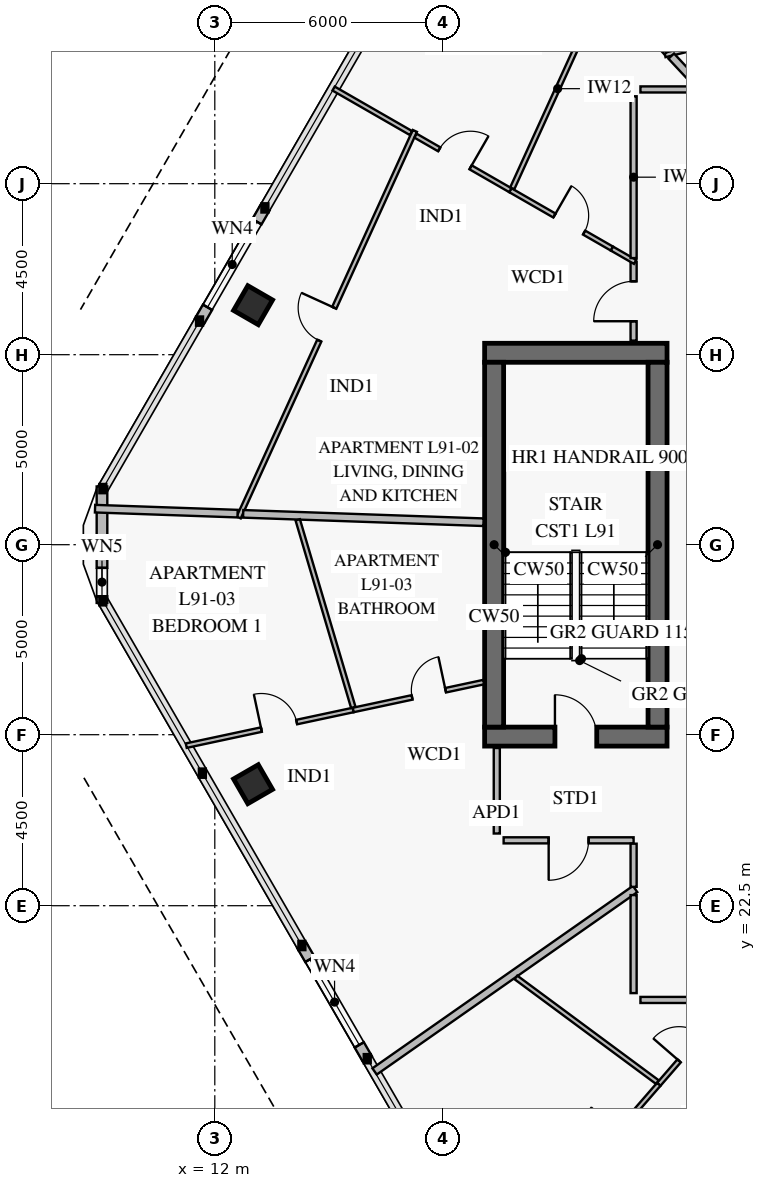
"""IFC4 building model, lengths in metres.
Left out: names, types, materials, properties, quantities, classifications, styles, units other than length and angle.
Written with IfcOpenShell. Run it as: python <this file> out.ifc"""

import sys

from ifc_helpers import new_model, si_unit, direction, frame, frame_2d, origin, origin_2d, place, context, subcontext, project, spatial, rectangle, extrude, element, fill, save


model = new_model("IFC4")
c1 = context("Model", 3, precision=1e-05, world=origin(), true_north=direction((0.0, 1.0)))
c2 = subcontext(c1, "Body", "Model", "MODEL_VIEW")
j1 = project(units=[si_unit("LENGTHUNIT", "METRE"), si_unit("PLANEANGLEUNIT", "RADIAN")], contexts=[c1])
p1 = place(None, origin())
s1 = spatial("IfcSite", under=j1, at=p1, CompositionType="ELEMENT")
p2 = place(p1, origin())
s2 = spatial("IfcBuilding", under=s1, at=p2, CompositionType="ELEMENT")
p3 = place(p2, frame((0.0, 0.0, 357.6)))
s3 = spatial("IfcBuildingStorey", under=s2, at=p3, CompositionType="ELEMENT", Elevation=357.6)
for number, where, z_axis, x_axis in (
    (1, (13.007, 38.302, 0.0), (0.0, 0.0, 1.0), (-0.5, -0.866, 0.0)),
    (2, (13.007, 25.698, 0.0), (0.0, 0.0, 1.0), (0.5, -0.866, 0.0)),
):
    element("IfcColumn", number, at=place(p3, frame(where, z_axis=z_axis, x_axis=x_axis)), inside=s3, PredefinedType="COLUMN", context=c2, shape_type="SweptSolid", body=[
        extrude(rectangle(XDim=0.75, YDim=0.75, at=origin_2d()), origin(), (0.0, 0.0, 1.0), 3.35),
    ])
p4 = place(p3, frame((19.1, 26.95, 0.0), z_axis=(0.0, 0.0, 1.0), x_axis=(1.0, 0.0, 0.0)))
e3 = element("IfcWall", 3, at=p4, inside=s3, PredefinedType="SHEAR", context=c2, shape_type="SweptSolid", body=[
    extrude(rectangle(XDim=4.8, YDim=0.5, at=frame_2d((2.4, 0.0))), origin(), (0.0, 0.0, 1.0), 3.8),
])
p5 = place(p4, frame((1.85, 0.0, 0.0)))
e4 = element("IfcOpeningElement", 4, at=p5, cuts=e3, PredefinedType="OPENING", context=c2, shape_type="SweptSolid", body=[
    extrude(rectangle(XDim=1.1, YDim=2.15, at=frame_2d((0.55, 1.075))), frame((0.0, 0.262, 0.0), z_axis=(0.0, -1.0, 0.0), x_axis=(1.0, 0.0, 0.0)), (0.0, 0.0, 1.0), 0.524),
])
p6 = place(p3, frame((23.9, 37.05, 0.0), z_axis=(0.0, 0.0, 1.0), x_axis=(-1.0, 0.0, 0.0)))
e5 = element("IfcWall", 5, at=p6, inside=s3, PredefinedType="SHEAR", context=c2, shape_type="SweptSolid", body=[
    extrude(rectangle(XDim=4.8, YDim=0.5, at=frame_2d((2.4, 0.0))), origin(), (0.0, 0.0, 1.0), 3.8),
])
for number, where, z_axis, x_axis in (
    (6, (19.35, 27.2, 0.0), (0.0, 0.0, 1.0), (0.0, 1.0, 0.0)),
    (7, (23.65, 36.8, 0.0), (0.0, 0.0, 1.0), (0.0, -1.0, 0.0)),
):
    element("IfcWall", number, at=place(p3, frame(where, z_axis=z_axis, x_axis=x_axis)), inside=s3, PredefinedType="SHEAR", context=c2, shape_type="SweptSolid", body=[
        extrude(rectangle(XDim=9.6, YDim=0.5, at=frame_2d((4.8, 0.0))), origin(), (0.0, 0.0, 1.0), 3.8),
    ])
p7 = place(p3, frame((16.011, 18.473, 0.0), z_axis=(0.0, 0.0, 1.0), x_axis=(-0.500009156386, 0.866020117278, 0.0)))
e8 = element("IfcWall", 8, at=p7, inside=s3, PredefinedType="SOLIDWALL", context=c2, shape_type="SweptSolid", body=[
    extrude(rectangle(XDim=3.44, YDim=0.28, at=frame_2d((1.72, 0.0))), origin(), (0.0, 0.0, 1.0), 3.35),
])
p8 = place(p7, frame((0.42, 0.0, 0.7)))
e9 = element("IfcOpeningElement", 9, at=p8, cuts=e8, PredefinedType="OPENING", context=c2, shape_type="SweptSolid", body=[
    extrude(rectangle(XDim=2.6, YDim=1.8, at=frame_2d((1.3, 0.9))), frame((0.0, 0.152, 0.0), z_axis=(0.0, -1.0, 0.0), x_axis=(1.0, 0.0, 0.0)), (0.0, 0.0, 1.0), 0.304),
])
p9 = place(p3, frame((9.031, 30.468, 0.0), z_axis=(0.0, 0.0, 1.0), x_axis=(0.0, 1.0, 0.0)))
e10 = element("IfcWall", 10, at=p9, inside=s3, PredefinedType="SOLIDWALL", context=c2, shape_type="SweptSolid", body=[
    extrude(rectangle(XDim=3.065, YDim=0.28, at=frame_2d((1.532, 0.0))), origin(), (0.0, 0.0, 1.0), 3.35),
])
p10 = place(p9, frame((0.173, 0.0, 0.85)))
e11 = element("IfcOpeningElement", 11, at=p10, cuts=e10, PredefinedType="OPENING", context=c2, shape_type="SweptSolid", body=[
    extrude(rectangle(XDim=0.75, YDim=1.5, at=frame_2d((0.375, 0.75))), frame((0.0, 0.152, 0.0), z_axis=(0.0, -1.0, 0.0), x_axis=(1.0, 0.0, 0.0)), (0.0, 0.0, 1.0), 0.304),
])
p11 = place(p3, frame((11.599, 37.884, 0.0), z_axis=(0.0, 0.0, 1.0), x_axis=(0.499978425106, 0.866037859697, 0.0)))
e12 = element("IfcWall", 12, at=p11, inside=s3, PredefinedType="SOLIDWALL", context=c2, shape_type="SweptSolid", body=[
    extrude(rectangle(XDim=3.44, YDim=0.28, at=frame_2d((1.72, 0.0))), origin(), (0.0, 0.0, 1.0), 3.35),
])
p12 = place(p11, frame((0.42, 0.0, 0.7)))
e13 = element("IfcOpeningElement", 13, at=p12, cuts=e12, PredefinedType="OPENING", context=c2, shape_type="SweptSolid", body=[
    extrude(rectangle(XDim=2.6, YDim=1.8, at=frame_2d((1.3, 0.9))), frame((0.0, 0.152, 0.0), z_axis=(0.0, -1.0, 0.0), x_axis=(1.0, 0.0, 0.0)), (0.0, 0.0, 1.0), 0.304),
])
p13 = place(p3, frame((17.264, 42.889, 0.0), z_axis=(0.0, 0.0, 1.0), x_axis=(-0.41468959687, -0.909962932348, 0.0)))
e14 = element("IfcWall", 14, at=p13, inside=s3, PredefinedType="PARTITIONING", context=c2, shape_type="SweptSolid", body=[
    extrude(rectangle(XDim=11.179, YDim=0.12, at=frame_2d((5.59, 0.0))), origin(), (0.0, 0.0, 1.0), 2.77),
])
p14 = place(p13, frame((5.115, 0.0, 0.0)))
e15 = element("IfcOpeningElement", 15, at=p14, cuts=e14, PredefinedType="OPENING", context=c2, shape_type="SweptSolid", body=[
    extrude(rectangle(XDim=0.95, YDim=2.1, at=frame_2d((0.475, 1.05))), frame((0.0, 0.072, 0.0), z_axis=(0.0, -1.0, 0.0), x_axis=(1.0, 0.0, 0.0)), (0.0, 0.0, 1.0), 0.144),
])
p15 = place(p3, frame((22.45, 39.792, 0.0), z_axis=(0.0, 0.0, 1.0), x_axis=(-0.86689518328, 0.498490462502, 0.0)))
e16 = element("IfcWall", 16, at=p15, inside=s3, PredefinedType="PARTITIONING", context=c2, shape_type="SweptSolid", body=[
    extrude(rectangle(XDim=3.083, YDim=0.12, at=frame_2d((1.542, 0.0))), origin(), (0.0, 0.0, 1.0), 3.35),
])
p16 = place(p15, frame((0.845, 0.0, 0.0)))
e17 = element("IfcOpeningElement", 17, at=p16, cuts=e16, PredefinedType="OPENING", context=c2, shape_type="SweptSolid", body=[
    extrude(rectangle(XDim=0.9, YDim=2.1, at=frame_2d((0.45, 1.05))), frame((0.0, 0.072, 0.0), z_axis=(0.0, -1.0, 0.0), x_axis=(1.0, 0.0, 0.0)), (0.0, 0.0, 1.0), 0.144),
])
p17 = place(p3, frame((19.777, 41.329, 0.0), z_axis=(0.0, 0.0, 1.0), x_axis=(-0.86688797535, 0.498502997176, 0.0)))
e18 = element("IfcWall", 18, at=p17, inside=s3, PredefinedType="PARTITIONING", context=c2, shape_type="SweptSolid", body=[
    extrude(rectangle(XDim=2.878, YDim=0.12, at=frame_2d((1.439, 0.0))), origin(), (0.0, 0.0, 1.0), 3.35),
])
p18 = place(p17, frame((1.208, 0.0, 0.0)))
e19 = element("IfcOpeningElement", 19, at=p18, cuts=e18, PredefinedType="OPENING", context=c2, shape_type="SweptSolid", body=[
    extrude(rectangle(XDim=0.95, YDim=2.1, at=frame_2d((0.475, 1.05))), frame((0.0, 0.072, 0.0), z_axis=(0.0, -1.0, 0.0), x_axis=(1.0, 0.0, 0.0)), (0.0, 0.0, 1.0), 0.144),
])
p19 = place(p3, frame((17.163, 42.832, 0.0), z_axis=(0.0, 0.0, 1.0), x_axis=(-0.866878245801, 0.498519916309, 0.0)))
e20 = element("IfcWall", 20, at=p19, inside=s3, PredefinedType="PARTITIONING", context=c2, shape_type="SweptSolid", body=[
    extrude(rectangle(XDim=2.35, YDim=0.12, at=frame_2d((1.175, 0.0))), origin(), (0.0, 0.0, 1.0), 2.77),
])
p20 = place(p3, frame((23.02, 39.441, 0.0), z_axis=(0.0, 0.0, 1.0), x_axis=(0.0, -1.0, 0.0)))
e21 = element("IfcWall", 21, at=p20, inside=s3, PredefinedType="PARTITIONING", context=c2, shape_type="SweptSolid", body=[
    extrude(rectangle(XDim=2.071, YDim=0.16, at=frame_2d((1.035, 0.0))), origin(), (0.0, 0.0, 1.0), 3.35),
])
p21 = place(p20, frame((0.51, 0.0, 0.0)))
e22 = element("IfcOpeningElement", 22, at=p21, cuts=e21, PredefinedType="OPENING", context=c2, shape_type="SweptSolid", body=[
    extrude(rectangle(XDim=1.05, YDim=2.15, at=frame_2d((0.525, 1.075))), frame((0.0, 0.092, 0.0), z_axis=(0.0, -1.0, 0.0), x_axis=(1.0, 0.0, 0.0)), (0.0, 0.0, 1.0), 0.184),
])
p22 = place(p3, frame((19.075, 28.384, 0.0), z_axis=(0.0, 0.0, 1.0), x_axis=(-0.977920196039, -0.208978683552, 0.0)))
e23 = element("IfcWall", 23, at=p22, inside=s3, PredefinedType="PARTITIONING", context=c2, shape_type="SweptSolid", body=[
    extrude(rectangle(XDim=3.514, YDim=0.12, at=frame_2d((1.757, 0.0))), origin(), (0.0, 0.0, 1.0), 3.35),
])
p23 = place(p22, frame((1.026, 0.0, 0.0)))
e24 = element("IfcOpeningElement", 24, at=p23, cuts=e23, PredefinedType="OPENING", context=c2, shape_type="SweptSolid", body=[
    extrude(rectangle(XDim=0.9, YDim=2.1, at=frame_2d((0.45, 1.05))), frame((0.0, 0.072, 0.0), z_axis=(0.0, -1.0, 0.0), x_axis=(1.0, 0.0, 0.0)), (0.0, 0.0, 1.0), 0.144),
])
p24 = place(p3, frame((15.638, 27.65, 0.0), z_axis=(0.0, 0.0, 1.0), x_axis=(-0.977931973844, -0.208923561462, 0.0)))
e25 = element("IfcWall", 25, at=p24, inside=s3, PredefinedType="PARTITIONING", context=c2, shape_type="SweptSolid", body=[
    extrude(rectangle(XDim=4.489, YDim=0.12, at=frame_2d((2.244, 0.0))), origin(), (0.0, 0.0, 1.0), 2.77),
])
p25 = place(p24, frame((1.517, 0.0, 0.0)))
e26 = element("IfcOpeningElement", 26, at=p25, cuts=e25, PredefinedType="OPENING", context=c2, shape_type="SweptSolid", body=[
    extrude(rectangle(XDim=0.95, YDim=2.1, at=frame_2d((0.475, 1.05))), frame((0.0, 0.072, 0.0), z_axis=(0.0, -1.0, 0.0), x_axis=(1.0, 0.0, 0.0)), (0.0, 0.0, 1.0), 0.144),
])
p26 = place(p3, frame((19.6, 24.22, 0.0), z_axis=(0.0, 0.0, 1.0), x_axis=(1.0, 0.0, 0.0)))
e27 = element("IfcWall", 27, at=p26, inside=s3, PredefinedType="PARTITIONING", context=c2, shape_type="SweptSolid", body=[
    extrude(rectangle(XDim=3.42, YDim=0.16, at=frame_2d((1.71, 0.0))), origin(), (0.0, 0.0, 1.0), 3.35),
])
p27 = place(p26, frame((1.185, 0.0, 0.0)))
e28 = element("IfcOpeningElement", 28, at=p27, cuts=e27, PredefinedType="OPENING", context=c2, shape_type="SweptSolid", body=[
    extrude(rectangle(XDim=1.05, YDim=2.15, at=frame_2d((0.525, 1.075))), frame((0.0, 0.092, 0.0), z_axis=(0.0, -1.0, 0.0), x_axis=(1.0, 0.0, 0.0)), (0.0, 0.0, 1.0), 0.184),
])
p28 = place(p3, frame((25.114, 19.45, 0.0), z_axis=(0.0, 0.0, 1.0), x_axis=(-0.65532612628, -0.755346058582, 0.0)))
e29 = element("IfcWall", 29, at=p28, inside=s3, PredefinedType="PARTITIONING", context=c2, shape_type="SweptSolid", body=[
    extrude(rectangle(XDim=2.185, YDim=0.12, at=frame_2d((1.092, 0.0))), origin(), (0.0, 0.0, 1.0), 3.35),
])
p29 = place(p28, frame((0.468, 0.0, 0.0)))
e30 = element("IfcOpeningElement", 30, at=p29, cuts=e29, PredefinedType="OPENING", context=c2, shape_type="SweptSolid", body=[
    extrude(rectangle(XDim=0.9, YDim=2.1, at=frame_2d((0.45, 1.05))), frame((0.0, 0.072, 0.0), z_axis=(0.0, -1.0, 0.0), x_axis=(1.0, 0.0, 0.0)), (0.0, 0.0, 1.0), 0.144),
])
p30 = place(p3, frame((23.682, 17.8, 0.0), z_axis=(0.0, 0.0, 1.0), x_axis=(-0.655229787073, -0.755429630166, 0.0)))
e31 = element("IfcWall", 31, at=p30, inside=s3, PredefinedType="PARTITIONING", context=c2, shape_type="SweptSolid", body=[
    extrude(rectangle(XDim=3.416, YDim=0.12, at=frame_2d((1.708, 0.0))), origin(), (0.0, 0.0, 1.0), 3.35),
])
p31 = place(p30, frame((1.627, 0.0, 0.0)))
e32 = element("IfcOpeningElement", 32, at=p31, cuts=e31, PredefinedType="OPENING", context=c2, shape_type="SweptSolid", body=[
    extrude(rectangle(XDim=0.95, YDim=2.1, at=frame_2d((0.475, 1.05))), frame((0.0, 0.072, 0.0), z_axis=(0.0, -1.0, 0.0), x_axis=(1.0, 0.0, 0.0)), (0.0, 0.0, 1.0), 0.144),
])
p32 = place(p3, frame((34.114, 47.4, 0.0), z_axis=(0.0, 0.0, 1.0), x_axis=(-0.97134085317, -0.237690864282, 0.0)))
e33 = element("IfcWall", 33, at=p32, inside=s3, PredefinedType="PARTITIONING", context=c2, shape_type="SweptSolid", body=[
    extrude(rectangle(XDim=10.571, YDim=0.12, at=frame_2d((5.286, 0.0))), origin(), (0.0, 0.0, 1.0), 2.8),
])
p33 = place(p3, frame((24.866, 43.94, 0.0), z_axis=(0.0, 0.0, 1.0), x_axis=(-0.68185345298, 0.731488802826, 0.0)))
e34 = element("IfcWall", 34, at=p33, inside=s3, PredefinedType="PARTITIONING", context=c2, shape_type="SweptSolid", body=[
    extrude(rectangle(XDim=1.254, YDim=0.2, at=frame_2d((0.627, 0.0))), origin(), (0.0, 0.0, 1.0), 3.35),
])
p34 = place(p3, frame((23.904, 44.971, 0.0), z_axis=(0.0, 0.0, 1.0), x_axis=(-0.681993072999, 0.73135863185, 0.0)))
e35 = element("IfcWall", 35, at=p34, inside=s3, PredefinedType="PARTITIONING", context=c2, shape_type="SweptSolid", body=[
    extrude(rectangle(XDim=7.438, YDim=0.2, at=frame_2d((3.719, 0.0))), origin(), (0.0, 0.0, 1.0), 2.77),
])
p35 = place(p3, frame((23.06, 39.441, 0.0), z_axis=(0.0, 0.0, 1.0), x_axis=(-0.867044954431, 0.498229913791, 0.0)))
e36 = element("IfcWall", 36, at=p35, inside=s3, PredefinedType="PARTITIONING", context=c2, shape_type="SweptSolid", body=[
    extrude(rectangle(XDim=0.704, YDim=0.12, at=frame_2d((0.352, 0.0))), origin(), (0.0, 0.0, 1.0), 3.35),
])
p36 = place(p3, frame((22.217, 46.622, 0.0), z_axis=(0.0, 0.0, 1.0), x_axis=(-0.414709230253, -0.909953984739, 0.0)))
e37 = element("IfcWall", 37, at=p36, inside=s3, PredefinedType="PARTITIONING", context=c2, shape_type="SweptSolid", body=[
    extrude(rectangle(XDim=5.763, YDim=0.12, at=frame_2d((2.881, 0.0))), origin(), (0.0, 0.0, 1.0), 2.8),
])
p37 = place(p3, frame((19.07, 32.591, 0.0), z_axis=(0.0, 0.0, 1.0), x_axis=(-0.999391476656, 0.034880888572, 0.0)))
e38 = element("IfcWall", 38, at=p37, inside=s3, PredefinedType="PARTITIONING", context=c2, shape_type="SweptSolid", body=[
    extrude(rectangle(XDim=6.327, YDim=0.2, at=frame_2d((3.164, 0.0))), origin(), (0.0, 0.0, 1.0), 2.77),
])
p38 = place(p3, frame((12.6, 32.817, 0.0), z_axis=(0.0, 0.0, 1.0), x_axis=(-0.999391933242, 0.034867804219, 0.0)))
e39 = element("IfcWall", 39, at=p38, inside=s3, PredefinedType="PARTITIONING", context=c2, shape_type="SweptSolid", body=[
    extrude(rectangle(XDim=3.753, YDim=0.2, at=frame_2d((1.876, 0.0))), origin(), (0.0, 0.0, 1.0), 3.35),
])
p39 = place(p3, frame((14.182, 32.654, 0.0), z_axis=(0.0, 0.0, 1.0), x_axis=(0.284020478518, -0.958818214148, 0.0)))
e40 = element("IfcWall", 40, at=p39, inside=s3, PredefinedType="PARTITIONING", context=c2, shape_type="SweptSolid", body=[
    extrude(rectangle(XDim=5.146, YDim=0.12, at=frame_2d((2.573, 0.0))), origin(), (0.0, 0.0, 1.0), 3.35),
])
p40 = place(p3, frame((23.06, 22.939, 0.0), z_axis=(0.0, 0.0, 1.0), x_axis=(-0.819159279368, -0.573566103448, 0.0)))
e41 = element("IfcWall", 41, at=p40, inside=s3, PredefinedType="PARTITIONING", context=c2, shape_type="SweptSolid", body=[
    extrude(rectangle(XDim=8.369, YDim=0.2, at=frame_2d((4.185, 0.0))), origin(), (0.0, 0.0, 1.0), 2.77),
])
p41 = place(p3, frame((19.924, 20.612, 0.0), z_axis=(0.0, 0.0, 1.0), x_axis=(0.803864605419, -0.594812320111, 0.0)))
e42 = element("IfcWall", 42, at=p41, inside=s3, PredefinedType="PARTITIONING", context=c2, shape_type="SweptSolid", body=[
    extrude(rectangle(XDim=4.627, YDim=0.12, at=frame_2d((2.313, 0.0))), origin(), (0.0, 0.0, 1.0), 2.8),
])
p42 = place(p3, frame((23.02, 43.8, 0.0), z_axis=(0.0, 0.0, 1.0), x_axis=(0.0, -1.0, 0.0)))
e43 = element("IfcWall", 43, at=p42, inside=s3, PredefinedType="PARTITIONING", context=c2, shape_type="SweptSolid", body=[
    extrude(rectangle(XDim=4.258, YDim=0.16, at=frame_2d((2.129, 0.0))), origin(), (0.0, 0.0, 1.0), 3.35),
])
p43 = place(p3, frame((24.681, 43.98, 0.0), z_axis=(0.0, 0.0, 1.0), x_axis=(-1.0, 0.0, 0.0)))
e44 = element("IfcWall", 44, at=p43, inside=s3, PredefinedType="PARTITIONING", context=c2, shape_type="SweptSolid", body=[
    extrude(rectangle(XDim=1.481, YDim=0.16, at=frame_2d((0.74, 0.0))), origin(), (0.0, 0.0, 1.0), 2.8),
])
p44 = place(p3, frame((19.42, 26.65, 0.0), z_axis=(0.0, 0.0, 1.0), x_axis=(0.0, -1.0, 0.0)))
e45 = element("IfcWall", 45, at=p44, inside=s3, PredefinedType="PARTITIONING", context=c2, shape_type="SweptSolid", body=[
    extrude(rectangle(XDim=2.25, YDim=0.16, at=frame_2d((1.125, 0.0))), origin(), (0.0, 0.0, 1.0), 3.35),
])
p45 = place(p3, frame((23.02, 24.132, 0.0), z_axis=(0.0, 0.0, 1.0), x_axis=(0.0, -1.0, 0.0)))
e46 = element("IfcWall", 46, at=p45, inside=s3, PredefinedType="PARTITIONING", context=c2, shape_type="SweptSolid", body=[
    extrude(rectangle(XDim=1.136, YDim=0.16, at=frame_2d((0.568, 0.0))), origin(), (0.0, 0.0, 1.0), 3.35),
])
p46 = place(p3, frame((23.02, 22.779, 0.0), z_axis=(0.0, 0.0, 1.0), x_axis=(0.0, -1.0, 0.0)))
e47 = element("IfcWall", 47, at=p46, inside=s3, PredefinedType="PARTITIONING", context=c2, shape_type="SweptSolid", body=[
    extrude(rectangle(XDim=2.579, YDim=0.16, at=frame_2d((1.29, 0.0))), origin(), (0.0, 0.0, 1.0), 3.35),
])
p47 = place(p3, frame((23.2, 20.02, 0.0), z_axis=(0.0, 0.0, 1.0), x_axis=(1.0, 0.0, 0.0)))
e48 = element("IfcWall", 48, at=p47, inside=s3, PredefinedType="PARTITIONING", context=c2, shape_type="SweptSolid", body=[
    extrude(rectangle(XDim=2.318, YDim=0.16, at=frame_2d((1.159, 0.0))), origin(), (0.0, 0.0, 1.0), 2.8),
])
p48 = place(p8, origin())
e49 = element("IfcWindow", 49, at=p48, inside=s3, PartitioningType="SINGLE_PANEL", PredefinedType="WINDOW", context=c2, shape_type="SweptSolid", body=[
    extrude(rectangle(XDim=2.6, YDim=1.8, at=frame_2d((1.3, 0.9))), frame((0.0, 0.03, 0.0), z_axis=(0.0, -1.0, 0.0), x_axis=(1.0, 0.0, 0.0)), (0.0, 0.0, 1.0), 0.06),
])
fill(e9, e49)
p49 = place(p10, origin())
e50 = element("IfcWindow", 50, at=p49, inside=s3, PartitioningType="SINGLE_PANEL", PredefinedType="WINDOW", context=c2, shape_type="SweptSolid", body=[
    extrude(rectangle(XDim=0.75, YDim=1.5, at=frame_2d((0.375, 0.75))), frame((0.0, 0.03, 0.0), z_axis=(0.0, -1.0, 0.0), x_axis=(1.0, 0.0, 0.0)), (0.0, 0.0, 1.0), 0.06),
])
fill(e11, e50)
p50 = place(p12, origin())
e51 = element("IfcWindow", 51, at=p50, inside=s3, PartitioningType="SINGLE_PANEL", PredefinedType="WINDOW", context=c2, shape_type="SweptSolid", body=[
    extrude(rectangle(XDim=2.6, YDim=1.8, at=frame_2d((1.3, 0.9))), frame((0.0, 0.03, 0.0), z_axis=(0.0, -1.0, 0.0), x_axis=(1.0, 0.0, 0.0)), (0.0, 0.0, 1.0), 0.06),
])
fill(e13, e51)
p51 = place(p5, origin())
e52 = element("IfcDoor", 52, at=p51, inside=s3, OperationType="SINGLE_SWING_LEFT", PredefinedType="USERDEFINED", context=c2, shape_type="SweptSolid", body=[
    extrude(rectangle(XDim=1.1, YDim=2.15, at=frame_2d((0.55, 1.075))), frame((0.0, 0.025, 0.0), z_axis=(0.0, -1.0, 0.0), x_axis=(1.0, 0.0, 0.0)), (0.0, 0.0, 1.0), 0.05),
])
fill(e4, e52)
p52 = place(p14, frame((0.95, 0.0, 0.0), z_axis=(0.0, 0.0, 1.0), x_axis=(-1.0, 0.0, 0.0)))
e53 = element("IfcDoor", 53, at=p52, inside=s3, OperationType="SINGLE_SWING_RIGHT", PredefinedType="DOOR", context=c2, shape_type="SweptSolid", body=[
    extrude(rectangle(XDim=0.95, YDim=2.1, at=frame_2d((0.475, 1.05))), frame((0.0, 0.025, 0.0), z_axis=(0.0, -1.0, 0.0), x_axis=(1.0, 0.0, 0.0)), (0.0, 0.0, 1.0), 0.05),
])
fill(e15, e53)
p53 = place(p16, frame((0.9, 0.0, 0.0), z_axis=(0.0, 0.0, 1.0), x_axis=(-1.0, 0.0, 0.0)))
e54 = element("IfcDoor", 54, at=p53, inside=s3, OperationType="SINGLE_SWING_LEFT", PredefinedType="DOOR", context=c2, shape_type="SweptSolid", body=[
    extrude(rectangle(XDim=0.9, YDim=2.1, at=frame_2d((0.45, 1.05))), frame((0.0, 0.025, 0.0), z_axis=(0.0, -1.0, 0.0), x_axis=(1.0, 0.0, 0.0)), (0.0, 0.0, 1.0), 0.05),
])
fill(e17, e54)
p54 = place(p18, frame((0.95, 0.0, 0.0), z_axis=(0.0, 0.0, 1.0), x_axis=(-1.0, 0.0, 0.0)))
e55 = element("IfcDoor", 55, at=p54, inside=s3, OperationType="SINGLE_SWING_RIGHT", PredefinedType="DOOR", context=c2, shape_type="SweptSolid", body=[
    extrude(rectangle(XDim=0.95, YDim=2.1, at=frame_2d((0.475, 1.05))), frame((0.0, 0.025, 0.0), z_axis=(0.0, -1.0, 0.0), x_axis=(1.0, 0.0, 0.0)), (0.0, 0.0, 1.0), 0.05),
])
fill(e19, e55)
p55 = place(p21, frame((1.05, 0.0, 0.0), z_axis=(0.0, 0.0, 1.0), x_axis=(-1.0, 0.0, 0.0)))
e56 = element("IfcDoor", 56, at=p55, inside=s3, OperationType="SINGLE_SWING_LEFT", PredefinedType="DOOR", context=c2, shape_type="SweptSolid", body=[
    extrude(rectangle(XDim=1.05, YDim=2.15, at=frame_2d((0.525, 1.075))), frame((0.0, 0.025, 0.0), z_axis=(0.0, -1.0, 0.0), x_axis=(1.0, 0.0, 0.0)), (0.0, 0.0, 1.0), 0.05),
])
fill(e22, e56)
p56 = place(p23, frame((0.9, 0.0, 0.0), z_axis=(0.0, 0.0, 1.0), x_axis=(-1.0, 0.0, 0.0)))
e57 = element("IfcDoor", 57, at=p56, inside=s3, OperationType="SINGLE_SWING_RIGHT", PredefinedType="DOOR", context=c2, shape_type="SweptSolid", body=[
    extrude(rectangle(XDim=0.9, YDim=2.1, at=frame_2d((0.45, 1.05))), frame((0.0, 0.025, 0.0), z_axis=(0.0, -1.0, 0.0), x_axis=(1.0, 0.0, 0.0)), (0.0, 0.0, 1.0), 0.05),
])
fill(e24, e57)
p57 = place(p25, frame((0.95, 0.0, 0.0), z_axis=(0.0, 0.0, 1.0), x_axis=(-1.0, 0.0, 0.0)))
e58 = element("IfcDoor", 58, at=p57, inside=s3, OperationType="SINGLE_SWING_LEFT", PredefinedType="DOOR", context=c2, shape_type="SweptSolid", body=[
    extrude(rectangle(XDim=0.95, YDim=2.1, at=frame_2d((0.475, 1.05))), frame((0.0, 0.025, 0.0), z_axis=(0.0, -1.0, 0.0), x_axis=(1.0, 0.0, 0.0)), (0.0, 0.0, 1.0), 0.05),
])
fill(e26, e58)
p58 = place(p27, frame((1.05, 0.0, 0.0), z_axis=(0.0, 0.0, 1.0), x_axis=(-1.0, 0.0, 0.0)))
e59 = element("IfcDoor", 59, at=p58, inside=s3, OperationType="SINGLE_SWING_RIGHT", PredefinedType="DOOR", context=c2, shape_type="SweptSolid", body=[
    extrude(rectangle(XDim=1.05, YDim=2.15, at=frame_2d((0.525, 1.075))), frame((0.0, 0.025, 0.0), z_axis=(0.0, -1.0, 0.0), x_axis=(1.0, 0.0, 0.0)), (0.0, 0.0, 1.0), 0.05),
])
fill(e28, e59)
p59 = place(p29, frame((0.9, 0.0, 0.0), z_axis=(0.0, 0.0, 1.0), x_axis=(-1.0, 0.0, 0.0)))
e60 = element("IfcDoor", 60, at=p59, inside=s3, OperationType="SINGLE_SWING_LEFT", PredefinedType="DOOR", context=c2, shape_type="SweptSolid", body=[
    extrude(rectangle(XDim=0.9, YDim=2.1, at=frame_2d((0.45, 1.05))), frame((0.0, 0.025, 0.0), z_axis=(0.0, -1.0, 0.0), x_axis=(1.0, 0.0, 0.0)), (0.0, 0.0, 1.0), 0.05),
])
fill(e30, e60)
save(model, sys.argv[1])
